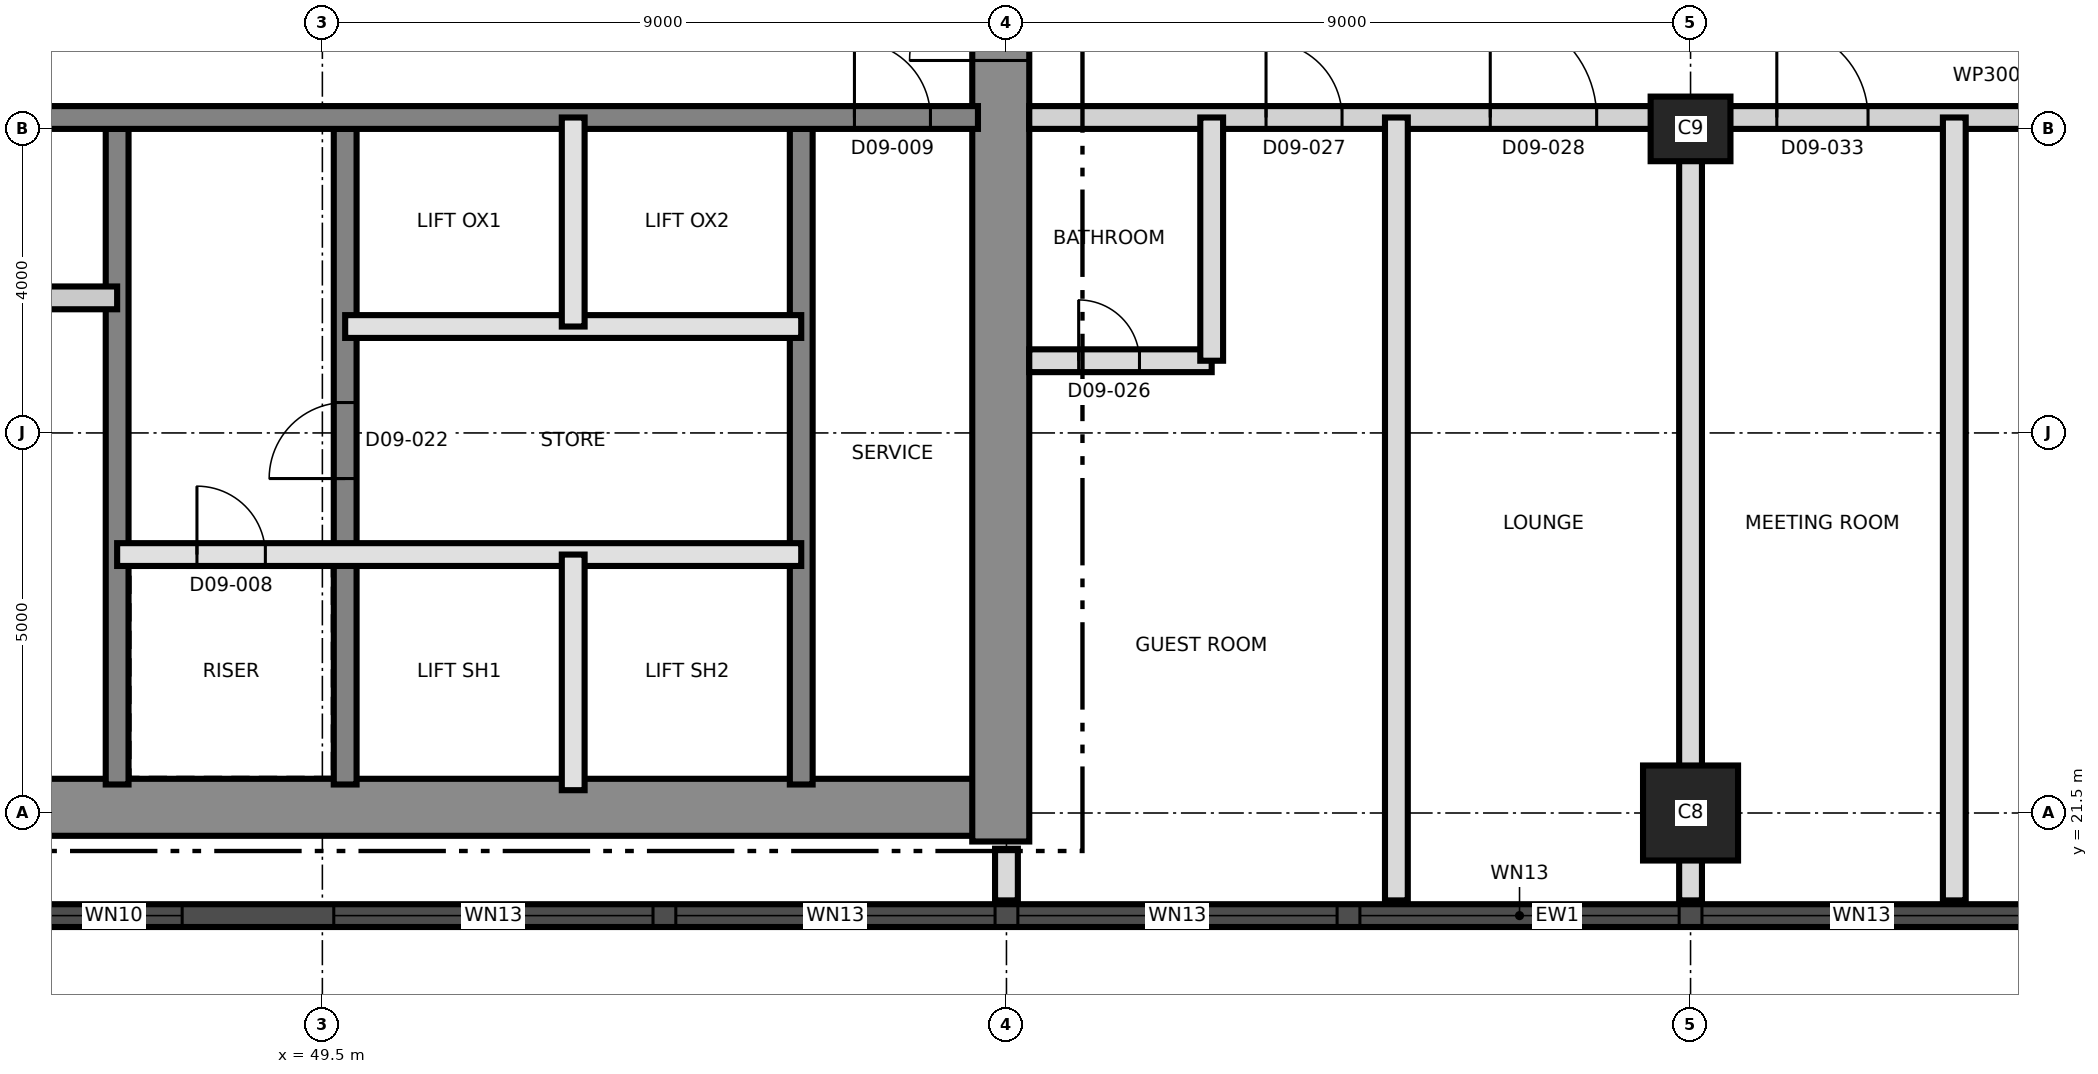
"""IFC4 building model, lengths in metres.
Left out: names, types, materials, properties, quantities, classifications, styles, units other than length and angle.
Written with IfcOpenShell. Run it as: python <this file> out.ifc"""

import sys

from ifc_helpers import new_model, si_unit, direction, frame, frame_2d, origin, origin_2d, place, context, subcontext, project, spatial, rectangle, extrude, element, fill, save


model = new_model("IFC4")
c1 = context("Model", 3, precision=1e-05, world=origin(), true_north=direction((0.0, 1.0)))
c2 = subcontext(c1, "Body", "Model", "MODEL_VIEW")
j1 = project(units=[si_unit("LENGTHUNIT", "METRE"), si_unit("PLANEANGLEUNIT", "RADIAN")], contexts=[c1])
p1 = place(None, origin())
s1 = spatial("IfcSite", under=j1, at=p1, CompositionType="ELEMENT")
p2 = place(p1, origin())
s2 = spatial("IfcBuilding", under=s1, at=p2, CompositionType="ELEMENT")
p3 = place(p2, frame((0.0, 0.0, 105.6)))
s3 = spatial("IfcBuildingStorey", under=s2, at=p3, CompositionType="ELEMENT", Elevation=105.6)
p4 = place(p3, frame((31.125, 21.575, 0.0), z_axis=(0.0, 0.0, 1.0), x_axis=(1.0, 0.0, 0.0)))
e1 = element("IfcWall", 1, at=p4, inside=s3, PredefinedType="SHEAR", context=c2, shape_type="SweptSolid", body=[
    extrude(rectangle(XDim=27.0, YDim=0.75, at=frame_2d((13.5, 0.0))), origin(), (0.0, 0.0, 1.0), 3.7),
])
p5 = place(p3, frame((58.425, 21.125, 0.0), z_axis=(0.0, 0.0, 1.0), x_axis=(0.0, 1.0, 0.0)))
e2 = element("IfcWall", 2, at=p5, inside=s3, PredefinedType="SHEAR", context=c2, shape_type="SweptSolid", body=[
    extrude(rectangle(XDim=18.75, YDim=0.75, at=frame_2d((9.375, 0.0))), origin(), (0.0, 0.0, 1.0), 3.7),
])
p6 = place(p5, frame((10.275, 0.0, 0.0)))
e3 = element("IfcOpeningElement", 3, at=p6, cuts=e2, PredefinedType="OPENING", context=c2, shape_type="SweptSolid", body=[
    extrude(rectangle(XDim=1.2, YDim=2.1, at=frame_2d((0.6, 1.05))), frame((0.0, 0.385, 0.0), z_axis=(0.0, -1.0, 0.0), x_axis=(1.0, 0.0, 0.0)), (0.0, 0.0, 1.0), 0.77),
])
p7 = place(p3, frame((46.8, 21.875, 0.0), z_axis=(0.0, 0.0, 1.0), x_axis=(0.0, 1.0, 0.0)))
e4 = element("IfcWall", 4, at=p7, inside=s3, PredefinedType="SHEAR", context=c2, shape_type="SweptSolid", body=[
    extrude(rectangle(XDim=8.625, YDim=0.3, at=frame_2d((4.312, 0.0))), origin(), (0.0, 0.0, 1.0), 3.7),
])
p8 = place(p3, frame((49.8, 21.875, 0.0), z_axis=(0.0, 0.0, 1.0), x_axis=(0.0, 1.0, 0.0)))
e5 = element("IfcWall", 5, at=p8, inside=s3, PredefinedType="SHEAR", context=c2, shape_type="SweptSolid", body=[
    extrude(rectangle(XDim=8.625, YDim=0.3, at=frame_2d((4.312, 0.0))), origin(), (0.0, 0.0, 1.0), 3.7),
])
p9 = place(p8, frame((4.025, 0.0, 0.0)))
e6 = element("IfcOpeningElement", 6, at=p9, cuts=e5, PredefinedType="OPENING", context=c2, shape_type="SweptSolid", body=[
    extrude(rectangle(XDim=1.0, YDim=2.1, at=frame_2d((0.5, 1.05))), frame((0.0, 0.16, 0.0), z_axis=(0.0, -1.0, 0.0), x_axis=(1.0, 0.0, 0.0)), (0.0, 0.0, 1.0), 0.32),
])
p10 = place(p3, frame((55.8, 21.875, 0.0), z_axis=(0.0, 0.0, 1.0), x_axis=(0.0, 1.0, 0.0)))
e7 = element("IfcWall", 7, at=p10, inside=s3, PredefinedType="SHEAR", context=c2, shape_type="SweptSolid", body=[
    extrude(rectangle(XDim=8.625, YDim=0.3, at=frame_2d((4.312, 0.0))), origin(), (0.0, 0.0, 1.0), 3.7),
])
p11 = place(p3, frame((31.875, 30.65, 0.0), z_axis=(0.0, 0.0, 1.0), x_axis=(1.0, 0.0, 0.0)))
e8 = element("IfcWall", 8, at=p11, inside=s3, PredefinedType="SHEAR", context=c2, shape_type="SweptSolid", body=[
    extrude(rectangle(XDim=26.25, YDim=0.3, at=frame_2d((13.125, 0.0))), origin(), (0.0, 0.0, 1.0), 3.7),
])
p12 = place(p11, frame((24.625, 0.0, 0.0)))
e9 = element("IfcOpeningElement", 9, at=p12, cuts=e8, PredefinedType="OPENING", context=c2, shape_type="SweptSolid", body=[
    extrude(rectangle(XDim=1.0, YDim=2.1, at=frame_2d((0.5, 1.05))), frame((0.0, 0.16, 0.0), z_axis=(0.0, -1.0, 0.0), x_axis=(1.0, 0.0, 0.0)), (0.0, 0.0, 1.0), 0.32),
])
p13 = place(p11, frame((11.425, 0.0, 0.0)))
e10 = element("IfcOpeningElement", 10, at=p13, cuts=e8, PredefinedType="OPENING", context=c2, shape_type="SweptSolid", body=[
    extrude(rectangle(XDim=1.0, YDim=2.1, at=frame_2d((0.5, 1.05))), frame((0.0, 0.16, 0.0), z_axis=(0.0, -1.0, 0.0), x_axis=(1.0, 0.0, 0.0)), (0.0, 0.0, 1.0), 0.32),
])
p14 = place(p3, frame((67.5, 21.5, 0.0), z_axis=(0.0, 0.0, 1.0), x_axis=(1.0, 0.0, 0.0)))
e11 = element("IfcColumn", 11, at=p14, inside=s3, PredefinedType="COLUMN", context=c2, shape_type="SweptSolid", body=[
    extrude(rectangle(XDim=1.25, YDim=1.25, at=origin_2d()), origin(), (0.0, 0.0, 1.0), 3.7),
])
p15 = place(p3, frame((67.5, 30.5, 0.0), z_axis=(0.0, 0.0, 1.0), x_axis=(1.0, 0.0, 0.0)))
e12 = element("IfcColumn", 12, at=p15, inside=s3, PredefinedType="COLUMN", context=c2, shape_type="SweptSolid", body=[
    extrude(rectangle(XDim=1.05, YDim=0.85, at=origin_2d()), origin(), (0.0, 0.0, 1.0), 3.7),
])
p16 = place(p3, frame((44.011, 20.15, 0.0), z_axis=(0.0, 0.0, 1.0), x_axis=(1.0, 0.0, 0.0)))
e13 = element("IfcWall", 13, at=p16, inside=s3, PredefinedType="SOLIDWALL", context=c2, shape_type="SweptSolid", body=[
    extrude(rectangle(XDim=43.476, YDim=0.3, at=frame_2d((21.738, 0.0))), origin(), (0.0, 0.0, 1.0), 3.4),
])
p17 = place(p16, frame((1.845, 0.0, 0.3)))
e14 = element("IfcOpeningElement", 14, at=p17, cuts=e13, PredefinedType="OPENING", context=c2, shape_type="SweptSolid", body=[
    extrude(rectangle(XDim=1.8, YDim=2.4, at=frame_2d((0.9, 1.2))), frame((0.0, 0.16, 0.0), z_axis=(0.0, -1.0, 0.0), x_axis=(1.0, 0.0, 0.0)), (0.0, 0.0, 1.0), 0.32),
])
p18 = place(p16, frame((5.639, 0.0, 0.9)))
e15 = element("IfcOpeningElement", 15, at=p18, cuts=e13, PredefinedType="OPENING", context=c2, shape_type="SweptSolid", body=[
    extrude(rectangle(XDim=4.2, YDim=1.7, at=frame_2d((2.1, 0.85))), frame((0.0, 0.16, 0.0), z_axis=(0.0, -1.0, 0.0), x_axis=(1.0, 0.0, 0.0)), (0.0, 0.0, 1.0), 0.32),
])
p19 = place(p16, frame((10.139, 0.0, 0.9)))
e16 = element("IfcOpeningElement", 16, at=p19, cuts=e13, PredefinedType="OPENING", context=c2, shape_type="SweptSolid", body=[
    extrude(rectangle(XDim=4.2, YDim=1.7, at=frame_2d((2.1, 0.85))), frame((0.0, 0.16, 0.0), z_axis=(0.0, -1.0, 0.0), x_axis=(1.0, 0.0, 0.0)), (0.0, 0.0, 1.0), 0.32),
])
p20 = place(p16, frame((14.639, 0.0, 0.9)))
e17 = element("IfcOpeningElement", 17, at=p20, cuts=e13, PredefinedType="OPENING", context=c2, shape_type="SweptSolid", body=[
    extrude(rectangle(XDim=4.2, YDim=1.7, at=frame_2d((2.1, 0.85))), frame((0.0, 0.16, 0.0), z_axis=(0.0, -1.0, 0.0), x_axis=(1.0, 0.0, 0.0)), (0.0, 0.0, 1.0), 0.32),
])
p21 = place(p16, frame((19.139, 0.0, 0.9)))
e18 = element("IfcOpeningElement", 18, at=p21, cuts=e13, PredefinedType="OPENING", context=c2, shape_type="SweptSolid", body=[
    extrude(rectangle(XDim=4.2, YDim=1.7, at=frame_2d((2.1, 0.85))), frame((0.0, 0.16, 0.0), z_axis=(0.0, -1.0, 0.0), x_axis=(1.0, 0.0, 0.0)), (0.0, 0.0, 1.0), 0.32),
])
p22 = place(p16, frame((23.639, 0.0, 0.9)))
e19 = element("IfcOpeningElement", 19, at=p22, cuts=e13, PredefinedType="OPENING", context=c2, shape_type="SweptSolid", body=[
    extrude(rectangle(XDim=4.2, YDim=1.7, at=frame_2d((2.1, 0.85))), frame((0.0, 0.16, 0.0), z_axis=(0.0, -1.0, 0.0), x_axis=(1.0, 0.0, 0.0)), (0.0, 0.0, 1.0), 0.32),
])
p23 = place(p16, frame((28.139, 0.0, 0.9)))
e20 = element("IfcOpeningElement", 20, at=p23, cuts=e13, PredefinedType="OPENING", context=c2, shape_type="SweptSolid", body=[
    extrude(rectangle(XDim=4.2, YDim=1.7, at=frame_2d((2.1, 0.85))), frame((0.0, 0.16, 0.0), z_axis=(0.0, -1.0, 0.0), x_axis=(1.0, 0.0, 0.0)), (0.0, 0.0, 1.0), 0.32),
])
p24 = place(p16, frame((32.639, 0.0, 0.9)))
e21 = element("IfcOpeningElement", 21, at=p24, cuts=e13, PredefinedType="OPENING", context=c2, shape_type="SweptSolid", body=[
    extrude(rectangle(XDim=4.2, YDim=1.7, at=frame_2d((2.1, 0.85))), frame((0.0, 0.16, 0.0), z_axis=(0.0, -1.0, 0.0), x_axis=(1.0, 0.0, 0.0)), (0.0, 0.0, 1.0), 0.32),
])
p25 = place(p16, frame((37.139, 0.0, 0.9)))
e22 = element("IfcOpeningElement", 22, at=p25, cuts=e13, PredefinedType="OPENING", context=c2, shape_type="SweptSolid", body=[
    extrude(rectangle(XDim=4.2, YDim=1.7, at=frame_2d((2.1, 0.85))), frame((0.0, 0.16, 0.0), z_axis=(0.0, -1.0, 0.0), x_axis=(1.0, 0.0, 0.0)), (0.0, 0.0, 1.0), 0.32),
])
p26 = place(p3, frame((46.8, 24.9, 0.0), z_axis=(0.0, 0.0, 1.0), x_axis=(1.0, 0.0, 0.0)))
e23 = element("IfcWall", 23, at=p26, inside=s3, PredefinedType="SOLIDWALL", context=c2, shape_type="SweptSolid", body=[
    extrude(rectangle(XDim=9.0, YDim=0.3, at=frame_2d((4.5, 0.0))), origin(), (0.0, 0.0, 1.0), 3.4),
])
p27 = place(p26, frame((1.05, 0.0, 0.0)))
e24 = element("IfcOpeningElement", 24, at=p27, cuts=e23, PredefinedType="OPENING", context=c2, shape_type="SweptSolid", body=[
    extrude(rectangle(XDim=0.9, YDim=2.1, at=frame_2d((0.45, 1.05))), frame((0.0, 0.16, 0.0), z_axis=(0.0, -1.0, 0.0), x_axis=(1.0, 0.0, 0.0)), (0.0, 0.0, 1.0), 0.32),
])
p28 = place(p3, frame((49.8, 27.9, 0.0), z_axis=(0.0, 0.0, 1.0), x_axis=(1.0, 0.0, 0.0)))
e25 = element("IfcWall", 25, at=p28, inside=s3, PredefinedType="SOLIDWALL", context=c2, shape_type="SweptSolid", body=[
    extrude(rectangle(XDim=6.0, YDim=0.3, at=frame_2d((3.0, 0.0))), origin(), (0.0, 0.0, 1.0), 3.4),
])
p29 = place(p3, frame((40.8, 28.277, 0.0), z_axis=(0.0, 0.0, 1.0), x_axis=(1.0, 0.0, 0.0)))
e26 = element("IfcWall", 26, at=p29, inside=s3, PredefinedType="PARTITIONING", context=c2, shape_type="SweptSolid", body=[
    extrude(rectangle(XDim=6.0, YDim=0.3, at=frame_2d((3.0, 0.0))), origin(), (0.0, 0.0, 1.0), 3.4),
])
p30 = place(p3, frame((52.8, 21.8, 0.0), z_axis=(0.0, 0.0, 1.0), x_axis=(0.0, 1.0, 0.0)))
e27 = element("IfcWall", 27, at=p30, inside=s3, PredefinedType="SOLIDWALL", context=c2, shape_type="SweptSolid", body=[
    extrude(rectangle(XDim=3.1, YDim=0.3, at=frame_2d((1.55, 0.0))), origin(), (0.0, 0.0, 1.0), 3.4),
])
p31 = place(p3, frame((52.8, 27.9, 0.0), z_axis=(0.0, 0.0, 1.0), x_axis=(0.0, 1.0, 0.0)))
e28 = element("IfcWall", 28, at=p31, inside=s3, PredefinedType="SOLIDWALL", context=c2, shape_type="SweptSolid", body=[
    extrude(rectangle(XDim=2.75, YDim=0.3, at=frame_2d((1.375, 0.0))), origin(), (0.0, 0.0, 1.0), 3.4),
])
p32 = place(p3, frame((58.8, 27.45, 0.0), z_axis=(0.0, 0.0, 1.0), x_axis=(1.0, 0.0, 0.0)))
e29 = element("IfcWall", 29, at=p32, inside=s3, PredefinedType="PARTITIONING", context=c2, shape_type="SweptSolid", body=[
    extrude(rectangle(XDim=2.4, YDim=0.3, at=frame_2d((1.2, 0.0))), origin(), (0.0, 0.0, 1.0), 3.4),
])
p33 = place(p32, frame((0.65, 0.0, 0.0)))
e30 = element("IfcOpeningElement", 30, at=p33, cuts=e29, PredefinedType="OPENING", context=c2, shape_type="SweptSolid", body=[
    extrude(rectangle(XDim=0.8, YDim=2.1, at=frame_2d((0.4, 1.05))), frame((0.0, 0.16, 0.0), z_axis=(0.0, -1.0, 0.0), x_axis=(1.0, 0.0, 0.0)), (0.0, 0.0, 1.0), 0.32),
])
p34 = place(p3, frame((58.8, 30.65, 0.0), z_axis=(0.0, 0.0, 1.0), x_axis=(1.0, 0.0, 0.0)))
e31 = element("IfcWall", 31, at=p34, inside=s3, PredefinedType="PARTITIONING", context=c2, shape_type="SweptSolid", body=[
    extrude(rectangle(XDim=26.53, YDim=0.3, at=frame_2d((13.265, 0.0))), origin(), (0.0, 0.0, 1.0), 3.4),
])
p35 = place(p34, frame((3.115, 0.0, 0.0)))
e32 = element("IfcOpeningElement", 32, at=p35, cuts=e31, PredefinedType="OPENING", context=c2, shape_type="SweptSolid", body=[
    extrude(rectangle(XDim=1.0, YDim=2.1, at=frame_2d((0.5, 1.05))), frame((0.0, 0.16, 0.0), z_axis=(0.0, -1.0, 0.0), x_axis=(1.0, 0.0, 0.0)), (0.0, 0.0, 1.0), 0.32),
])
p36 = place(p34, frame((6.065, 0.0, 0.0)))
e33 = element("IfcOpeningElement", 33, at=p36, cuts=e31, PredefinedType="OPENING", context=c2, shape_type="SweptSolid", body=[
    extrude(rectangle(XDim=1.4, YDim=2.1, at=frame_2d((0.7, 1.05))), frame((0.0, 0.16, 0.0), z_axis=(0.0, -1.0, 0.0), x_axis=(1.0, 0.0, 0.0)), (0.0, 0.0, 1.0), 0.32),
])
p37 = place(p34, frame((9.835, 0.0, 0.0)))
e34 = element("IfcOpeningElement", 34, at=p37, cuts=e31, PredefinedType="OPENING", context=c2, shape_type="SweptSolid", body=[
    extrude(rectangle(XDim=1.2, YDim=2.1, at=frame_2d((0.6, 1.05))), frame((0.0, 0.16, 0.0), z_axis=(0.0, -1.0, 0.0), x_axis=(1.0, 0.0, 0.0)), (0.0, 0.0, 1.0), 0.32),
])
p38 = place(p34, frame((13.085, 0.0, 0.0)))
e35 = element("IfcOpeningElement", 35, at=p38, cuts=e31, PredefinedType="OPENING", context=c2, shape_type="SweptSolid", body=[
    extrude(rectangle(XDim=1.0, YDim=2.1, at=frame_2d((0.5, 1.05))), frame((0.0, 0.16, 0.0), z_axis=(0.0, -1.0, 0.0), x_axis=(1.0, 0.0, 0.0)), (0.0, 0.0, 1.0), 0.32),
])
p39 = place(p34, frame((21.7, 0.0, 0.0)))
e36 = element("IfcOpeningElement", 36, at=p39, cuts=e31, PredefinedType="OPENING", context=c2, shape_type="SweptSolid", body=[
    extrude(rectangle(XDim=1.0, YDim=2.4, at=frame_2d((0.5, 1.2))), frame((0.0, 0.16, 0.0), z_axis=(0.0, -1.0, 0.0), x_axis=(1.0, 0.0, 0.0)), (0.0, 0.0, 1.0), 0.32),
])
p40 = place(p3, frame((58.5, 20.35, 0.0), z_axis=(0.0, 0.0, 1.0), x_axis=(0.0, 1.0, 0.0)))
e37 = element("IfcWall", 37, at=p40, inside=s3, PredefinedType="PARTITIONING", context=c2, shape_type="SweptSolid", body=[
    extrude(rectangle(XDim=0.68, YDim=0.3, at=frame_2d((0.34, 0.0))), origin(), (0.0, 0.0, 1.0), 3.4),
])
p41 = place(p3, frame((61.2, 27.45, 0.0), z_axis=(0.0, 0.0, 1.0), x_axis=(0.0, 1.0, 0.0)))
e38 = element("IfcWall", 38, at=p41, inside=s3, PredefinedType="PARTITIONING", context=c2, shape_type="SweptSolid", body=[
    extrude(rectangle(XDim=3.2, YDim=0.3, at=frame_2d((1.6, 0.0))), origin(), (0.0, 0.0, 1.0), 3.4),
])
for number, where, z_axis, x_axis in (
    (39, (63.63, 20.35, 0.0), (0.0, 0.0, 1.0), (0.0, 1.0, 0.0)),
    (40, (67.5, 20.35, 0.0), (0.0, 0.0, 1.0), (0.0, 1.0, 0.0)),
    (41, (70.97, 20.35, 0.0), (0.0, 0.0, 1.0), (0.0, 1.0, 0.0)),
):
    element("IfcWall", number, at=place(p3, frame(where, z_axis=z_axis, x_axis=x_axis)), inside=s3, PredefinedType="PARTITIONING", context=c2, shape_type="SweptSolid", body=[
        extrude(rectangle(XDim=10.3, YDim=0.3, at=frame_2d((5.15, 0.0))), origin(), (0.0, 0.0, 1.0), 3.4),
    ])
p42 = place(p17, origin())
e42 = element("IfcWindow", 42, at=p42, inside=s3, PartitioningType="SINGLE_PANEL", PredefinedType="WINDOW", context=c2, shape_type="SweptSolid", body=[
    extrude(rectangle(XDim=1.8, YDim=2.4, at=frame_2d((0.9, 1.2))), frame((0.0, 0.03, 0.0), z_axis=(0.0, -1.0, 0.0), x_axis=(1.0, 0.0, 0.0)), (0.0, 0.0, 1.0), 0.06),
])
fill(e14, e42)
p43 = place(p18, origin())
e43 = element("IfcWindow", 43, at=p43, inside=s3, PartitioningType="SINGLE_PANEL", PredefinedType="WINDOW", context=c2, shape_type="SweptSolid", body=[
    extrude(rectangle(XDim=4.2, YDim=1.7, at=frame_2d((2.1, 0.85))), frame((0.0, 0.03, 0.0), z_axis=(0.0, -1.0, 0.0), x_axis=(1.0, 0.0, 0.0)), (0.0, 0.0, 1.0), 0.06),
])
fill(e15, e43)
p44 = place(p19, origin())
e44 = element("IfcWindow", 44, at=p44, inside=s3, PartitioningType="SINGLE_PANEL", PredefinedType="WINDOW", context=c2, shape_type="SweptSolid", body=[
    extrude(rectangle(XDim=4.2, YDim=1.7, at=frame_2d((2.1, 0.85))), frame((0.0, 0.03, 0.0), z_axis=(0.0, -1.0, 0.0), x_axis=(1.0, 0.0, 0.0)), (0.0, 0.0, 1.0), 0.06),
])
fill(e16, e44)
p45 = place(p20, origin())
e45 = element("IfcWindow", 45, at=p45, inside=s3, PartitioningType="SINGLE_PANEL", PredefinedType="WINDOW", context=c2, shape_type="SweptSolid", body=[
    extrude(rectangle(XDim=4.2, YDim=1.7, at=frame_2d((2.1, 0.85))), frame((0.0, 0.03, 0.0), z_axis=(0.0, -1.0, 0.0), x_axis=(1.0, 0.0, 0.0)), (0.0, 0.0, 1.0), 0.06),
])
fill(e17, e45)
p46 = place(p21, origin())
e46 = element("IfcWindow", 46, at=p46, inside=s3, PartitioningType="SINGLE_PANEL", PredefinedType="WINDOW", context=c2, shape_type="SweptSolid", body=[
    extrude(rectangle(XDim=4.2, YDim=1.7, at=frame_2d((2.1, 0.85))), frame((0.0, 0.03, 0.0), z_axis=(0.0, -1.0, 0.0), x_axis=(1.0, 0.0, 0.0)), (0.0, 0.0, 1.0), 0.06),
])
fill(e18, e46)
p47 = place(p22, origin())
e47 = element("IfcWindow", 47, at=p47, inside=s3, PartitioningType="SINGLE_PANEL", PredefinedType="WINDOW", context=c2, shape_type="SweptSolid", body=[
    extrude(rectangle(XDim=4.2, YDim=1.7, at=frame_2d((2.1, 0.85))), frame((0.0, 0.03, 0.0), z_axis=(0.0, -1.0, 0.0), x_axis=(1.0, 0.0, 0.0)), (0.0, 0.0, 1.0), 0.06),
])
fill(e19, e47)
p48 = place(p27, origin())
e48 = element("IfcDoor", 48, at=p48, inside=s3, OperationType="SINGLE_SWING_RIGHT", PredefinedType="DOOR", context=c2, shape_type="SweptSolid", body=[
    extrude(rectangle(XDim=0.9, YDim=2.1, at=frame_2d((0.45, 1.05))), frame((0.0, 0.025, 0.0), z_axis=(0.0, -1.0, 0.0), x_axis=(1.0, 0.0, 0.0)), (0.0, 0.0, 1.0), 0.05),
])
fill(e24, e48)
p49 = place(p12, origin())
e49 = element("IfcDoor", 49, at=p49, inside=s3, OperationType="SINGLE_SWING_LEFT", PredefinedType="DOOR", context=c2, shape_type="SweptSolid", body=[
    extrude(rectangle(XDim=1.0, YDim=2.1, at=frame_2d((0.5, 1.05))), frame((0.0, 0.025, 0.0), z_axis=(0.0, -1.0, 0.0), x_axis=(1.0, 0.0, 0.0)), (0.0, 0.0, 1.0), 0.05),
])
fill(e9, e49)
p50 = place(p6, origin())
e50 = element("IfcDoor", 50, at=p50, inside=s3, OperationType="SINGLE_SWING_LEFT", PredefinedType="DOOR", context=c2, shape_type="SweptSolid", body=[
    extrude(rectangle(XDim=1.2, YDim=2.1, at=frame_2d((0.6, 1.05))), frame((0.0, 0.025, 0.0), z_axis=(0.0, -1.0, 0.0), x_axis=(1.0, 0.0, 0.0)), (0.0, 0.0, 1.0), 0.05),
])
fill(e3, e50)
p51 = place(p9, origin())
e51 = element("IfcDoor", 51, at=p51, inside=s3, OperationType="SINGLE_SWING_LEFT", PredefinedType="DOOR", context=c2, shape_type="SweptSolid", body=[
    extrude(rectangle(XDim=1.0, YDim=2.1, at=frame_2d((0.5, 1.05))), frame((0.0, 0.025, 0.0), z_axis=(0.0, -1.0, 0.0), x_axis=(1.0, 0.0, 0.0)), (0.0, 0.0, 1.0), 0.05),
])
fill(e6, e51)
p52 = place(p33, origin())
e52 = element("IfcDoor", 52, at=p52, inside=s3, OperationType="SINGLE_SWING_LEFT", PredefinedType="DOOR", context=c2, shape_type="SweptSolid", body=[
    extrude(rectangle(XDim=0.8, YDim=2.1, at=frame_2d((0.4, 1.05))), frame((0.0, 0.025, 0.0), z_axis=(0.0, -1.0, 0.0), x_axis=(1.0, 0.0, 0.0)), (0.0, 0.0, 1.0), 0.05),
])
fill(e30, e52)
p53 = place(p35, origin())
e53 = element("IfcDoor", 53, at=p53, inside=s3, OperationType="SINGLE_SWING_RIGHT", PredefinedType="DOOR", context=c2, shape_type="SweptSolid", body=[
    extrude(rectangle(XDim=1.0, YDim=2.1, at=frame_2d((0.5, 1.05))), frame((0.0, 0.025, 0.0), z_axis=(0.0, -1.0, 0.0), x_axis=(1.0, 0.0, 0.0)), (0.0, 0.0, 1.0), 0.05),
])
fill(e32, e53)
p54 = place(p36, origin())
e54 = element("IfcDoor", 54, at=p54, inside=s3, OperationType="SINGLE_SWING_LEFT", PredefinedType="DOOR", context=c2, shape_type="SweptSolid", body=[
    extrude(rectangle(XDim=1.4, YDim=2.1, at=frame_2d((0.7, 1.05))), frame((0.0, 0.025, 0.0), z_axis=(0.0, -1.0, 0.0), x_axis=(1.0, 0.0, 0.0)), (0.0, 0.0, 1.0), 0.05),
])
fill(e33, e54)
p55 = place(p37, origin())
e55 = element("IfcDoor", 55, at=p55, inside=s3, OperationType="SINGLE_SWING_LEFT", PredefinedType="DOOR", context=c2, shape_type="SweptSolid", body=[
    extrude(rectangle(XDim=1.2, YDim=2.1, at=frame_2d((0.6, 1.05))), frame((0.0, 0.025, 0.0), z_axis=(0.0, -1.0, 0.0), x_axis=(1.0, 0.0, 0.0)), (0.0, 0.0, 1.0), 0.05),
])
fill(e34, e55)
save(model, sys.argv[1])
